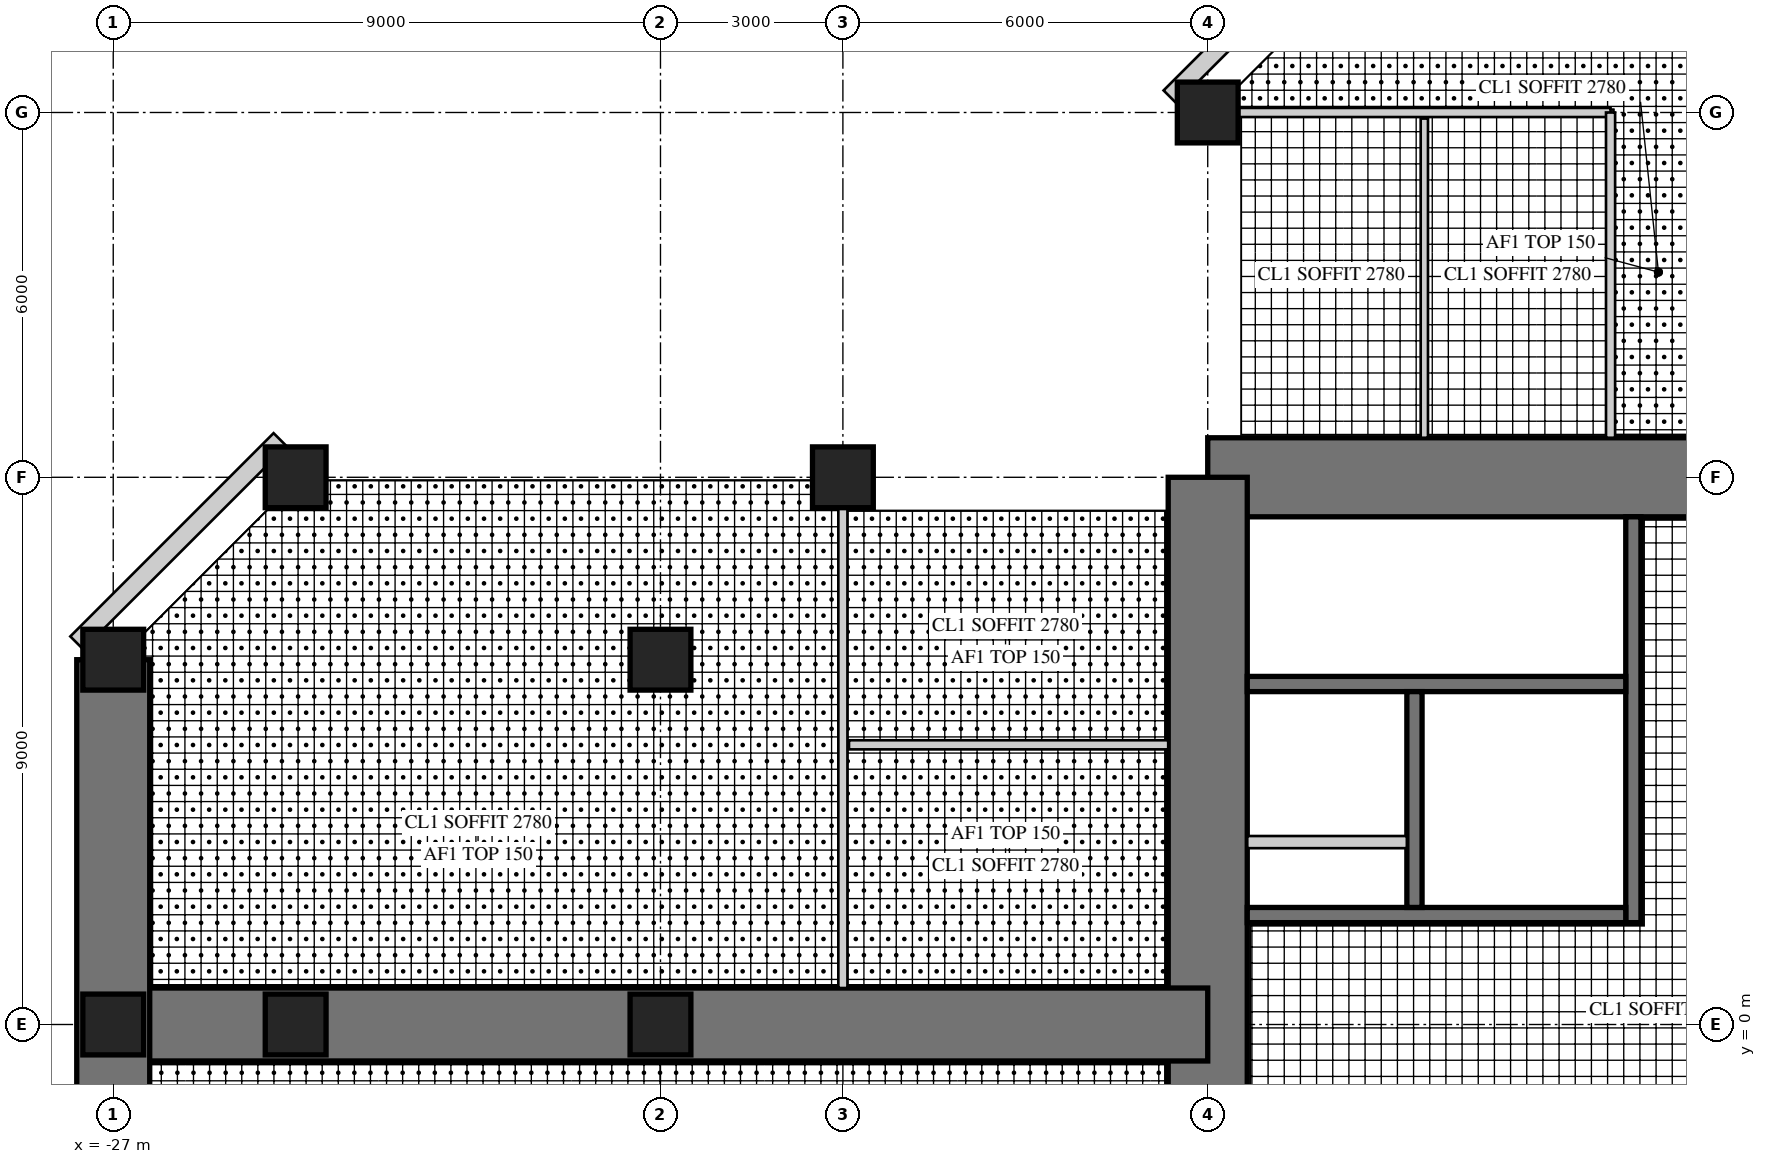
"""IFC4 building model, lengths in metres.
Left out: names, types, materials, properties, quantities, classifications, styles, units other than length and angle.
Written with IfcOpenShell. Run it as: python <this file> out.ifc"""

import sys

from ifc_helpers import new_model, si_unit, direction, frame, frame_2d, origin, origin_2d, place, context, subcontext, project, spatial, rectangle, hollow_rectangle, extrude, element, fill, save


model = new_model("IFC4")
c1 = context("Model", 3, precision=1e-05, world=origin(), true_north=direction((0.0, 1.0)))
c2 = subcontext(c1, "Body", "Model", "MODEL_VIEW")
j1 = project(units=[si_unit("LENGTHUNIT", "METRE"), si_unit("PLANEANGLEUNIT", "RADIAN")], contexts=[c1])
p1 = place(None, origin())
s1 = spatial("IfcSite", under=j1, at=p1, CompositionType="ELEMENT")
p2 = place(p1, origin())
s2 = spatial("IfcBuilding", under=s1, at=p2, CompositionType="ELEMENT")
p3 = place(p2, frame((0.0, 0.0, 116.5)))
s3 = spatial("IfcBuildingStorey", under=s2, at=p3, CompositionType="ELEMENT", Elevation=116.5)
p4 = place(p3, frame((9.0, 9.0, 0.0), z_axis=(0.0, 0.0, 1.0), x_axis=(-1.0, 0.0, 0.0)))
e1 = element("IfcWall", 1, at=p4, inside=s3, PredefinedType="SHEAR", context=c2, shape_type="SweptSolid", body=[
    extrude(rectangle(XDim=18.0, YDim=1.3, at=frame_2d((9.0, 0.0))), origin(), (0.0, 0.0, 1.0), 4.0),
])
p5 = place(p4, frame((9.8, 0.0, 0.0)))
e2 = element("IfcOpeningElement", 2, at=p5, cuts=e1, PredefinedType="OPENING", context=c2, shape_type="SweptSolid", body=[
    extrude(rectangle(XDim=1.0, YDim=2.4, at=frame_2d((0.5, 1.2))), frame((0.0, 0.66, 0.0), z_axis=(0.0, -1.0, 0.0), x_axis=(1.0, 0.0, 0.0)), (0.0, 0.0, 1.0), 1.32),
])
p6 = place(p3, frame((-9.0, 9.0, 0.0), z_axis=(0.0, 0.0, 1.0), x_axis=(0.0, -1.0, 0.0)))
e3 = element("IfcWall", 3, at=p6, inside=s3, PredefinedType="SHEAR", context=c2, shape_type="SweptSolid", body=[
    extrude(rectangle(XDim=18.0, YDim=1.3, at=frame_2d((9.0, 0.0))), origin(), (0.0, 0.0, 1.0), 4.0),
])
p7 = place(p6, frame((9.8, 0.0, 0.0)))
e4 = element("IfcOpeningElement", 4, at=p7, cuts=e3, PredefinedType="OPENING", context=c2, shape_type="SweptSolid", body=[
    extrude(rectangle(XDim=1.0, YDim=2.4, at=frame_2d((0.5, 1.2))), frame((0.0, 0.66, 0.0), z_axis=(0.0, -1.0, 0.0), x_axis=(1.0, 0.0, 0.0)), (0.0, 0.0, 1.0), 1.32),
])
p8 = place(p3, frame((-2.0, 1.675, 0.0), z_axis=(0.0, 0.0, 1.0), x_axis=(0.0, 1.0, 0.0)))
e5 = element("IfcWall", 5, at=p8, inside=s3, PredefinedType="SHEAR", context=c2, shape_type="SweptSolid", body=[
    extrude(rectangle(XDim=6.675, YDim=0.25, at=frame_2d((3.337, 0.0))), origin(), (0.0, 0.0, 1.0), 4.0),
])
p9 = place(p8, frame((0.725, 0.0, 0.0)))
e6 = element("IfcOpeningElement", 6, at=p9, cuts=e5, PredefinedType="OPENING", context=c2, shape_type="SweptSolid", body=[
    extrude(rectangle(XDim=1.0, YDim=2.1, at=frame_2d((0.5, 1.05))), frame((0.0, 0.135, 0.0), z_axis=(0.0, -1.0, 0.0), x_axis=(1.0, 0.0, 0.0)), (0.0, 0.0, 1.0), 0.27),
])
p10 = place(p3, frame((-2.125, 1.8, 0.0), z_axis=(0.0, 0.0, 1.0), x_axis=(-1.0, 0.0, 0.0)))
e7 = element("IfcWall", 7, at=p10, inside=s3, PredefinedType="SHEAR", context=c2, shape_type="SweptSolid", body=[
    extrude(rectangle(XDim=6.225, YDim=0.25, at=frame_2d((3.113, 0.0))), origin(), (0.0, 0.0, 1.0), 4.0),
])
p11 = place(p3, frame((-2.125, 5.6, 0.0), z_axis=(0.0, 0.0, 1.0), x_axis=(-1.0, 0.0, 0.0)))
e8 = element("IfcWall", 8, at=p11, inside=s3, PredefinedType="SHEAR", context=c2, shape_type="SweptSolid", body=[
    extrude(rectangle(XDim=6.225, YDim=0.25, at=frame_2d((3.113, 0.0))), origin(), (0.0, 0.0, 1.0), 4.0),
])
p12 = place(p11, frame((0.175, 0.0, 0.0)))
e9 = element("IfcOpeningElement", 9, at=p12, cuts=e8, PredefinedType="OPENING", context=c2, shape_type="SweptSolid", body=[
    extrude(rectangle(XDim=1.0, YDim=2.1, at=frame_2d((0.5, 1.05))), frame((0.0, 0.135, 0.0), z_axis=(0.0, -1.0, 0.0), x_axis=(1.0, 0.0, 0.0)), (0.0, 0.0, 1.0), 0.27),
])
p13 = place(p3, frame((-5.6, 1.925, 0.0), z_axis=(0.0, 0.0, 1.0), x_axis=(0.0, 1.0, 0.0)))
e10 = element("IfcWall", 10, at=p13, inside=s3, PredefinedType="SHEAR", context=c2, shape_type="SweptSolid", body=[
    extrude(rectangle(XDim=3.55, YDim=0.25, at=frame_2d((1.775, 0.0))), origin(), (0.0, 0.0, 1.0), 4.0),
])
p14 = place(p13, frame((1.525, 0.0, 0.0)))
e11 = element("IfcOpeningElement", 11, at=p14, cuts=e10, PredefinedType="OPENING", context=c2, shape_type="SweptSolid", body=[
    extrude(rectangle(XDim=1.1, YDim=2.2, at=frame_2d((0.55, 1.1))), frame((0.0, 0.135, 0.0), z_axis=(0.0, -1.0, 0.0), x_axis=(1.0, 0.0, 0.0)), (0.0, 0.0, 1.0), 0.27),
])
p15 = place(p13, frame((0.075, 0.0, 0.0)))
e12 = element("IfcOpeningElement", 12, at=p15, cuts=e10, PredefinedType="OPENING", context=c2, shape_type="SweptSolid", body=[
    extrude(rectangle(XDim=0.8, YDim=2.1, at=frame_2d((0.4, 1.05))), frame((0.0, 0.135, 0.0), z_axis=(0.0, -1.0, 0.0), x_axis=(1.0, 0.0, 0.0)), (0.0, 0.0, 1.0), 0.27),
])
p16 = place(p3, frame((-5.725, 3.0, 0.0), z_axis=(0.0, 0.0, 1.0), x_axis=(-1.0, 0.0, 0.0)))
e13 = element("IfcWall", 13, at=p16, inside=s3, PredefinedType="PARTITIONING", context=c2, shape_type="SweptSolid", body=[
    extrude(rectangle(XDim=2.625, YDim=0.2, at=frame_2d((1.312, 0.0))), origin(), (0.0, 0.0, 1.0), 4.0),
])
p17 = place(p3, frame((-9.0, 0.0, 0.0), z_axis=(0.0, 0.0, 1.0), x_axis=(-1.0, 0.0, 0.0)))
e14 = element("IfcWall", 14, at=p17, inside=s3, PredefinedType="SHEAR", context=c2, shape_type="SweptSolid", body=[
    extrude(rectangle(XDim=18.0, YDim=1.2, at=frame_2d((9.0, 0.0))), origin(), (0.0, 0.0, 1.0), 4.0),
])
p18 = place(p17, frame((9.8, 0.0, 0.0)))
e15 = element("IfcOpeningElement", 15, at=p18, cuts=e14, PredefinedType="OPENING", context=c2, shape_type="SweptSolid", body=[
    extrude(rectangle(XDim=1.0, YDim=2.2, at=frame_2d((0.5, 1.1))), frame((0.0, 0.61, 0.0), z_axis=(0.0, -1.0, 0.0), x_axis=(1.0, 0.0, 0.0)), (0.0, 0.0, 1.0), 1.22),
])
p19 = place(p3, frame((-27.0, 6.0, 0.0), z_axis=(0.0, 0.0, 1.0), x_axis=(0.0, -1.0, 0.0)))
e16 = element("IfcWall", 16, at=p19, inside=s3, PredefinedType="SHEAR", context=c2, shape_type="SweptSolid", body=[
    extrude(rectangle(XDim=12.0, YDim=1.2, at=frame_2d((6.0, 0.0))), origin(), (0.0, 0.0, 1.0), 4.0),
])
p20 = place(p19, frame((1.55, 0.0, 0.6)))
e17 = element("IfcOpeningElement", 17, at=p20, cuts=e16, PredefinedType="OPENING", context=c2, shape_type="SweptSolid", body=[
    extrude(rectangle(XDim=3.0, YDim=2.4, at=frame_2d((1.5, 1.2))), frame((0.0, 0.61, 0.0), z_axis=(0.0, -1.0, 0.0), x_axis=(1.0, 0.0, 0.0)), (0.0, 0.0, 1.0), 1.22),
])
p21 = place(p19, frame((7.45, 0.0, 0.6)))
e18 = element("IfcOpeningElement", 18, at=p21, cuts=e16, PredefinedType="OPENING", context=c2, shape_type="SweptSolid", body=[
    extrude(rectangle(XDim=3.0, YDim=2.4, at=frame_2d((1.5, 1.2))), frame((0.0, 0.61, 0.0), z_axis=(0.0, -1.0, 0.0), x_axis=(1.0, 0.0, 0.0)), (0.0, 0.0, 1.0), 1.22),
])
for number, where, z_axis, x_axis in (
    (19, (-9.0, 15.0, 0.0), (0.0, 0.0, 1.0), (1.0, 0.0, 0.0)),
    (20, (-15.0, 9.0, 0.0), (0.0, 0.0, 1.0), (1.0, 0.0, 0.0)),
    (21, (-24.0, 9.0, 0.0), (0.0, 0.0, 1.0), (1.0, 0.0, 0.0)),
    (22, (-27.0, 6.0, 0.0), (0.0, 0.0, 1.0), (1.0, 0.0, 0.0)),
    (23, (-27.0, 0.0, 0.0), (0.0, 0.0, 1.0), (1.0, 0.0, 0.0)),
    (24, (-18.0, 6.0, 0.0), (0.0, 0.0, 1.0), (1.0, 0.0, 0.0)),
    (25, (-18.0, 0.0, 0.0), (0.0, 0.0, 1.0), (1.0, 0.0, 0.0)),
    (26, (-24.0, 0.0, 0.0), (0.0, 0.0, 1.0), (1.0, 0.0, 0.0)),
):
    element("IfcColumn", number, at=place(p3, frame(where, z_axis=z_axis, x_axis=x_axis)), inside=s3, PredefinedType="COLUMN", context=c2, shape_type="SweptSolid", body=[
        extrude(rectangle(XDim=1.0, YDim=1.0, at=origin_2d()), origin(), (0.0, 0.0, 1.0), 4.0),
    ])
p22 = place(p3, frame((-6.277, 18.6, 0.0), z_axis=(0.0, 0.0, 1.0), x_axis=(-0.707106781187, -0.707106781187, 0.0)))
e27 = element("IfcWall", 27, at=p22, inside=s3, PredefinedType="SOLIDWALL", context=c2, shape_type="SweptSolid", body=[
    extrude(rectangle(XDim=4.728, YDim=0.3, at=frame_2d((2.364, 0.0))), origin(), (0.0, 0.0, 1.0), 3.8),
])
p23 = place(p22, frame((1.914, 0.0, 0.3)))
e28 = element("IfcOpeningElement", 28, at=p23, cuts=e27, PredefinedType="OPENING", context=c2, shape_type="SweptSolid", body=[
    extrude(rectangle(XDim=0.9, YDim=2.4, at=frame_2d((0.45, 1.2))), frame((0.0, 0.16, 0.0), z_axis=(0.0, -1.0, 0.0), x_axis=(1.0, 0.0, 0.0)), (0.0, 0.0, 1.0), 0.32),
])
p24 = place(p3, frame((-24.257, 9.62, 0.0), z_axis=(0.0, 0.0, 1.0), x_axis=(-0.707106781187, -0.707106781187, 0.0)))
e29 = element("IfcWall", 29, at=p24, inside=s3, PredefinedType="SOLIDWALL", context=c2, shape_type="SweptSolid", body=[
    extrude(rectangle(XDim=4.728, YDim=0.3, at=frame_2d((2.364, 0.0))), origin(), (0.0, 0.0, 1.0), 3.8),
])
p25 = place(p24, frame((1.914, 0.0, 0.3)))
e30 = element("IfcOpeningElement", 30, at=p25, cuts=e29, PredefinedType="OPENING", context=c2, shape_type="SweptSolid", body=[
    extrude(rectangle(XDim=0.9, YDim=2.4, at=frame_2d((0.45, 1.2))), frame((0.0, 0.16, 0.0), z_axis=(0.0, -1.0, 0.0), x_axis=(1.0, 0.0, 0.0)), (0.0, 0.0, 1.0), 0.32),
])
p26 = place(p3, frame((-2.375, 15.0, 0.0), z_axis=(0.0, 0.0, 1.0), x_axis=(-1.0, 0.0, 0.0)))
e31 = element("IfcWall", 31, at=p26, inside=s3, PredefinedType="PARTITIONING", context=c2, shape_type="SweptSolid", body=[
    extrude(rectangle(XDim=6.125, YDim=0.15, at=frame_2d((3.062, 0.0))), origin(), (0.0, 0.0, 1.0), 3.0),
])
p27 = place(p26, frame((1.031, 0.0, 0.0)))
e32 = element("IfcOpeningElement", 32, at=p27, cuts=e31, PredefinedType="OPENING", context=c2, shape_type="SweptSolid", body=[
    extrude(rectangle(XDim=1.0, YDim=2.1, at=frame_2d((0.5, 1.05))), frame((0.0, 0.085, 0.0), z_axis=(0.0, -1.0, 0.0), x_axis=(1.0, 0.0, 0.0)), (0.0, 0.0, 1.0), 0.17),
])
p28 = place(p26, frame((4.094, 0.0, 0.0)))
e33 = element("IfcOpeningElement", 33, at=p28, cuts=e31, PredefinedType="OPENING", context=c2, shape_type="SweptSolid", body=[
    extrude(rectangle(XDim=1.0, YDim=2.1, at=frame_2d((0.5, 1.05))), frame((0.0, 0.085, 0.0), z_axis=(0.0, -1.0, 0.0), x_axis=(1.0, 0.0, 0.0)), (0.0, 0.0, 1.0), 0.17),
])
p29 = place(p3, frame((-2.375, 9.65, 0.0), z_axis=(0.0, 0.0, 1.0), x_axis=(0.0, 1.0, 0.0)))
e34 = element("IfcWall", 34, at=p29, inside=s3, PredefinedType="PARTITIONING", context=c2, shape_type="SweptSolid", body=[
    extrude(rectangle(XDim=5.35, YDim=0.15, at=frame_2d((2.675, 0.0))), origin(), (0.0, 0.0, 1.0), 3.8),
])
p30 = place(p3, frame((-5.438, 9.65, 0.0), z_axis=(0.0, 0.0, 1.0), x_axis=(0.0, 1.0, 0.0)))
e35 = element("IfcWall", 35, at=p30, inside=s3, PredefinedType="PLUMBINGWALL", context=c2, shape_type="SweptSolid", body=[
    extrude(rectangle(XDim=5.25, YDim=0.12, at=frame_2d((2.625, 0.0))), origin(), (0.0, 0.0, 1.0), 3.8),
])
p31 = place(p3, frame((-15.0, 8.5, 0.0), z_axis=(0.0, 0.0, 1.0), x_axis=(0.0, -1.0, 0.0)))
e36 = element("IfcWall", 36, at=p31, inside=s3, PredefinedType="PARTITIONING", context=c2, shape_type="SweptSolid", body=[
    extrude(rectangle(XDim=7.9, YDim=0.15, at=frame_2d((3.95, 0.0))), origin(), (0.0, 0.0, 1.0), 3.0),
])
p32 = place(p31, frame((1.45, 0.0, 0.0)))
e37 = element("IfcOpeningElement", 37, at=p32, cuts=e36, PredefinedType="OPENING", context=c2, shape_type="SweptSolid", body=[
    extrude(rectangle(XDim=1.0, YDim=2.1, at=frame_2d((0.5, 1.05))), frame((0.0, 0.085, 0.0), z_axis=(0.0, -1.0, 0.0), x_axis=(1.0, 0.0, 0.0)), (0.0, 0.0, 1.0), 0.17),
])
p33 = place(p31, frame((5.4, 0.0, 0.0)))
e38 = element("IfcOpeningElement", 38, at=p33, cuts=e36, PredefinedType="OPENING", context=c2, shape_type="SweptSolid", body=[
    extrude(rectangle(XDim=1.0, YDim=2.1, at=frame_2d((0.5, 1.05))), frame((0.0, 0.085, 0.0), z_axis=(0.0, -1.0, 0.0), x_axis=(1.0, 0.0, 0.0)), (0.0, 0.0, 1.0), 0.17),
])
p34 = place(p3, frame((-9.65, 4.6, 0.0), z_axis=(0.0, 0.0, 1.0), x_axis=(-1.0, 0.0, 0.0)))
e39 = element("IfcWall", 39, at=p34, inside=s3, PredefinedType="PARTITIONING", context=c2, shape_type="SweptSolid", body=[
    extrude(rectangle(XDim=5.25, YDim=0.15, at=frame_2d((2.625, 0.0))), origin(), (0.0, 0.0, 1.0), 3.8),
])
p35 = place(p25, origin())
e40 = element("IfcWindow", 40, at=p35, inside=s3, PartitioningType="SINGLE_PANEL", PredefinedType="WINDOW", context=c2, shape_type="SweptSolid", body=[
    extrude(hollow_rectangle(XDim=0.9, YDim=2.4, WallThickness=0.06, at=frame_2d((0.45, 1.2))), frame((0.0, 0.03, 0.0), z_axis=(0.0, -1.0, 0.0), x_axis=(1.0, 0.0, 0.0)), (0.0, 0.0, 1.0), 0.06),
    extrude(rectangle(XDim=0.779, YDim=2.279, at=frame_2d((0.45, 1.2))), frame((0.0, 0.03, 0.0), z_axis=(0.0, -1.0, 0.0), x_axis=(1.0, 0.0, 0.0)), (0.0, 0.0, 1.0), 0.06),
])
fill(e30, e40)
p36 = place(p20, origin())
e41 = element("IfcWindow", 41, at=p36, inside=s3, PartitioningType="SINGLE_PANEL", PredefinedType="WINDOW", context=c2, shape_type="SweptSolid", body=[
    extrude(hollow_rectangle(XDim=3.0, YDim=2.4, WallThickness=0.06, at=frame_2d((1.5, 1.2))), frame((0.0, 0.03, 0.0), z_axis=(0.0, -1.0, 0.0), x_axis=(1.0, 0.0, 0.0)), (0.0, 0.0, 1.0), 0.06),
    extrude(rectangle(XDim=2.879, YDim=2.279, at=frame_2d((1.5, 1.2))), frame((0.0, 0.03, 0.0), z_axis=(0.0, -1.0, 0.0), x_axis=(1.0, 0.0, 0.0)), (0.0, 0.0, 1.0), 0.06),
])
fill(e17, e41)
p37 = place(p27, origin())
e42 = element("IfcDoor", 42, at=p37, inside=s3, OperationType="SINGLE_SWING_LEFT", PredefinedType="DOOR", context=c2, shape_type="SweptSolid", body=[
    extrude(rectangle(XDim=1.0, YDim=2.1, at=frame_2d((0.5, 1.05))), frame((0.0, 0.025, 0.0), z_axis=(0.0, -1.0, 0.0), x_axis=(1.0, 0.0, 0.0)), (0.0, 0.0, 1.0), 0.05),
])
fill(e32, e42)
p38 = place(p28, origin())
e43 = element("IfcDoor", 43, at=p38, inside=s3, OperationType="SINGLE_SWING_LEFT", PredefinedType="DOOR", context=c2, shape_type="SweptSolid", body=[
    extrude(rectangle(XDim=1.0, YDim=2.1, at=frame_2d((0.5, 1.05))), frame((0.0, 0.025, 0.0), z_axis=(0.0, -1.0, 0.0), x_axis=(1.0, 0.0, 0.0)), (0.0, 0.0, 1.0), 0.05),
])
fill(e33, e43)
p39 = place(p32, origin())
e44 = element("IfcDoor", 44, at=p39, inside=s3, OperationType="SINGLE_SWING_RIGHT", PredefinedType="DOOR", context=c2, shape_type="SweptSolid", body=[
    extrude(rectangle(XDim=1.0, YDim=2.1, at=frame_2d((0.5, 1.05))), frame((0.0, 0.025, 0.0), z_axis=(0.0, -1.0, 0.0), x_axis=(1.0, 0.0, 0.0)), (0.0, 0.0, 1.0), 0.05),
])
fill(e37, e44)
p40 = place(p33, origin())
e45 = element("IfcDoor", 45, at=p40, inside=s3, OperationType="SINGLE_SWING_LEFT", PredefinedType="DOOR", context=c2, shape_type="SweptSolid", body=[
    extrude(rectangle(XDim=1.0, YDim=2.1, at=frame_2d((0.5, 1.05))), frame((0.0, 0.025, 0.0), z_axis=(0.0, -1.0, 0.0), x_axis=(1.0, 0.0, 0.0)), (0.0, 0.0, 1.0), 0.05),
])
fill(e38, e45)
p41 = place(p18, frame((1.0, 0.0, 0.0), z_axis=(0.0, 0.0, 1.0), x_axis=(-1.0, 0.0, 0.0)))
e46 = element("IfcDoor", 46, at=p41, inside=s3, OperationType="SINGLE_SWING_RIGHT", PredefinedType="DOOR", context=c2, shape_type="SweptSolid", body=[
    extrude(rectangle(XDim=1.0, YDim=2.2, at=frame_2d((0.5, 1.1))), frame((0.0, 0.025, 0.0), z_axis=(0.0, -1.0, 0.0), x_axis=(1.0, 0.0, 0.0)), (0.0, 0.0, 1.0), 0.05),
])
fill(e15, e46)
p42 = place(p5, frame((1.0, 0.0, 0.0), z_axis=(0.0, 0.0, 1.0), x_axis=(-1.0, 0.0, 0.0)))
e47 = element("IfcDoor", 47, at=p42, inside=s3, OperationType="SINGLE_SWING_RIGHT", PredefinedType="DOOR", context=c2, shape_type="SweptSolid", body=[
    extrude(rectangle(XDim=1.0, YDim=2.4, at=frame_2d((0.5, 1.2))), frame((0.0, -0.005, 0.0), z_axis=(0.0, -1.0, 0.0), x_axis=(1.0, 0.0, 0.0)), (0.0, 0.0, 1.0), 0.05),
])
fill(e2, e47)
p43 = place(p7, frame((1.0, 0.0, 0.0), z_axis=(0.0, 0.0, 1.0), x_axis=(-1.0, 0.0, 0.0)))
e48 = element("IfcDoor", 48, at=p43, inside=s3, OperationType="SINGLE_SWING_RIGHT", PredefinedType="DOOR", context=c2, shape_type="SweptSolid", body=[
    extrude(rectangle(XDim=1.0, YDim=2.4, at=frame_2d((0.5, 1.2))), frame((0.0, -0.005, 0.0), z_axis=(0.0, -1.0, 0.0), x_axis=(1.0, 0.0, 0.0)), (0.0, 0.0, 1.0), 0.05),
])
fill(e4, e48)
p44 = place(p9, origin())
e49 = element("IfcDoor", 49, at=p44, inside=s3, OperationType="SINGLE_SWING_LEFT", PredefinedType="DOOR", context=c2, shape_type="SweptSolid", body=[
    extrude(rectangle(XDim=1.0, YDim=2.1, at=frame_2d((0.5, 1.05))), frame((0.0, 0.025, 0.0), z_axis=(0.0, -1.0, 0.0), x_axis=(1.0, 0.0, 0.0)), (0.0, 0.0, 1.0), 0.05),
])
fill(e6, e49)
p45 = place(p12, frame((1.0, 0.0, 0.0), z_axis=(0.0, 0.0, 1.0), x_axis=(-1.0, 0.0, 0.0)))
e50 = element("IfcDoor", 50, at=p45, inside=s3, OperationType="SINGLE_SWING_RIGHT", PredefinedType="DOOR", context=c2, shape_type="SweptSolid", body=[
    extrude(rectangle(XDim=1.0, YDim=2.1, at=frame_2d((0.5, 1.05))), frame((0.0, 0.025, 0.0), z_axis=(0.0, -1.0, 0.0), x_axis=(1.0, 0.0, 0.0)), (0.0, 0.0, 1.0), 0.05),
])
fill(e9, e50)
p46 = place(p14, origin())
e51 = element("IfcDoor", 51, at=p46, inside=s3, OperationType="DOUBLE_DOOR_SLIDING", PredefinedType="DOOR", context=c2, shape_type="SweptSolid", body=[
    extrude(rectangle(XDim=1.1, YDim=2.2, at=frame_2d((0.55, 1.1))), frame((0.0, 0.025, 0.0), z_axis=(0.0, -1.0, 0.0), x_axis=(1.0, 0.0, 0.0)), (0.0, 0.0, 1.0), 0.05),
])
fill(e11, e51)
p47 = place(p15, origin())
e52 = element("IfcDoor", 52, at=p47, inside=s3, OperationType="SINGLE_SWING_LEFT", PredefinedType="DOOR", context=c2, shape_type="SweptSolid", body=[
    extrude(rectangle(XDim=0.8, YDim=2.1, at=frame_2d((0.4, 1.05))), frame((0.0, 0.025, 0.0), z_axis=(0.0, -1.0, 0.0), x_axis=(1.0, 0.0, 0.0)), (0.0, 0.0, 1.0), 0.05),
])
fill(e12, e52)
save(model, sys.argv[1])
